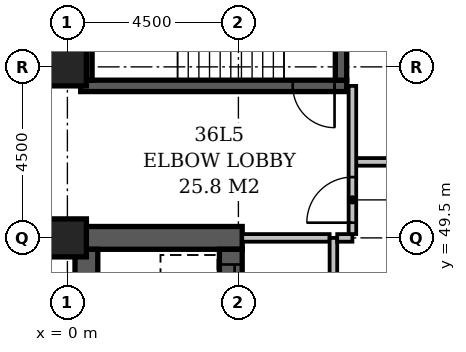
"""IFC4 building model, lengths in metres.
Left out: names, types, materials, properties, quantities, classifications, styles, units other than length and angle.
Written with IfcOpenShell. Run it as: python <this file> out.ifc"""

import sys

from ifc_helpers import new_model, si_unit, direction, frame, frame_2d, origin, origin_2d, place, context, subcontext, project, spatial, rectangle, extrude, element, fill, save


model = new_model("IFC4")
c1 = context("Model", 3, precision=1e-05, world=origin(), true_north=direction((0.0, 1.0)))
c2 = subcontext(c1, "Body", "Model", "MODEL_VIEW")
j1 = project(units=[si_unit("LENGTHUNIT", "METRE"), si_unit("PLANEANGLEUNIT", "RADIAN")], contexts=[c1])
p1 = place(None, origin())
s1 = spatial("IfcSite", under=j1, at=p1, CompositionType="ELEMENT")
p2 = place(p1, origin())
s2 = spatial("IfcBuilding", under=s1, at=p2, CompositionType="ELEMENT")
p3 = place(p2, frame((0.0, 0.0, 144.8)))
s3 = spatial("IfcBuildingStorey", under=s2, at=p3, CompositionType="ELEMENT", Elevation=144.8)
p4 = place(p3, frame((0.2, 49.5, -0.3), z_axis=(0.0, 0.0, 1.0), x_axis=(1.0, 0.0, 0.0)))
e1 = element("IfcWall", 1, at=p4, inside=s3, PredefinedType="SHEAR", context=c2, shape_type="SweptSolid", body=[
    extrude(rectangle(XDim=4.4, YDim=0.6, at=frame_2d((2.2, 0.0))), origin(), (0.0, 0.0, 1.0), 3.6),
])
p5 = place(p3, frame((0.35, 53.5, -0.3), z_axis=(0.0, 0.0, 1.0), x_axis=(1.0, 0.0, 0.0)))
e2 = element("IfcWall", 2, at=p5, inside=s3, PredefinedType="SHEAR", context=c2, shape_type="SweptSolid", body=[
    extrude(rectangle(XDim=7.0, YDim=0.3, at=frame_2d((3.5, 0.0))), origin(), (0.0, 0.0, 1.0), 3.6),
])
p6 = place(p5, frame((5.58, 0.0, 0.3)))
e3 = element("IfcOpeningElement", 3, at=p6, cuts=e2, PredefinedType="OPENING", context=c2, shape_type="SweptSolid", body=[
    extrude(rectangle(XDim=1.1, YDim=2.1, at=frame_2d((0.55, 1.05))), frame((0.0, 0.162, 0.0), z_axis=(0.0, -1.0, 0.0), x_axis=(1.0, 0.0, 0.0)), (0.0, 0.0, 1.0), 0.324),
])
p7 = place(p3, frame((0.5, 27.15, -0.3), z_axis=(0.0, 0.0, 1.0), x_axis=(0.0, 1.0, 0.0)))
e4 = element("IfcWall", 4, at=p7, inside=s3, PredefinedType="SHEAR", context=c2, shape_type="SweptSolid", body=[
    extrude(rectangle(XDim=22.05, YDim=0.6, at=frame_2d((11.025, 0.0))), origin(), (0.0, 0.0, 1.0), 3.6),
])
p8 = place(p3, frame((0.5, 53.65, -0.3), z_axis=(0.0, 0.0, 1.0), x_axis=(0.0, 1.0, 0.0)))
e5 = element("IfcWall", 5, at=p8, inside=s3, PredefinedType="SHEAR", context=c2, shape_type="SweptSolid", body=[
    extrude(rectangle(XDim=4.2, YDim=0.3, at=frame_2d((2.1, 0.0))), origin(), (0.0, 0.0, 1.0), 3.6),
])
p9 = place(p3, frame((4.3, 27.15, -0.3), z_axis=(0.0, 0.0, 1.0), x_axis=(0.0, 1.0, 0.0)))
e6 = element("IfcWall", 6, at=p9, inside=s3, PredefinedType="SHEAR", context=c2, shape_type="SweptSolid", body=[
    extrude(rectangle(XDim=22.05, YDim=0.6, at=frame_2d((11.025, 0.0))), origin(), (0.0, 0.0, 1.0), 3.6),
])
p10 = place(p9, frame((3.05, 0.0, 0.3)))
e7 = element("IfcOpeningElement", 7, at=p10, cuts=e6, PredefinedType="OPENING", context=c2, shape_type="SweptSolid", body=[
    extrude(rectangle(XDim=1.1, YDim=2.1, at=frame_2d((0.55, 1.05))), frame((0.0, 0.312, 0.0), z_axis=(0.0, -1.0, 0.0), x_axis=(1.0, 0.0, 0.0)), (0.0, 0.0, 1.0), 0.624),
])
p11 = place(p9, frame((0.55, 0.0, 0.3)))
e8 = element("IfcOpeningElement", 8, at=p11, cuts=e6, PredefinedType="OPENING", context=c2, shape_type="SweptSolid", body=[
    extrude(rectangle(XDim=1.1, YDim=2.1, at=frame_2d((0.55, 1.05))), frame((0.0, 0.312, 0.0), z_axis=(0.0, -1.0, 0.0), x_axis=(1.0, 0.0, 0.0)), (0.0, 0.0, 1.0), 0.624),
])
p12 = place(p9, frame((20.55, 0.0, 0.3)))
e9 = element("IfcOpeningElement", 9, at=p12, cuts=e6, PredefinedType="OPENING", context=c2, shape_type="SweptSolid", body=[
    extrude(rectangle(XDim=1.1, YDim=2.1, at=frame_2d((0.55, 1.05))), frame((0.0, 0.312, 0.0), z_axis=(0.0, -1.0, 0.0), x_axis=(1.0, 0.0, 0.0)), (0.0, 0.0, 1.0), 0.624),
])
p13 = place(p9, frame((18.05, 0.0, 0.3)))
e10 = element("IfcOpeningElement", 10, at=p13, cuts=e6, PredefinedType="OPENING", context=c2, shape_type="SweptSolid", body=[
    extrude(rectangle(XDim=1.1, YDim=2.1, at=frame_2d((0.55, 1.05))), frame((0.0, 0.312, 0.0), z_axis=(0.0, -1.0, 0.0), x_axis=(1.0, 0.0, 0.0)), (0.0, 0.0, 1.0), 0.624),
])
p14 = place(p9, frame((15.55, 0.0, 0.3)))
e11 = element("IfcOpeningElement", 11, at=p14, cuts=e6, PredefinedType="OPENING", context=c2, shape_type="SweptSolid", body=[
    extrude(rectangle(XDim=1.1, YDim=2.1, at=frame_2d((0.55, 1.05))), frame((0.0, 0.312, 0.0), z_axis=(0.0, -1.0, 0.0), x_axis=(1.0, 0.0, 0.0)), (0.0, 0.0, 1.0), 0.624),
])
p15 = place(p9, frame((13.05, 0.0, 0.3)))
e12 = element("IfcOpeningElement", 12, at=p15, cuts=e6, PredefinedType="OPENING", context=c2, shape_type="SweptSolid", body=[
    extrude(rectangle(XDim=1.1, YDim=2.1, at=frame_2d((0.55, 1.05))), frame((0.0, 0.312, 0.0), z_axis=(0.0, -1.0, 0.0), x_axis=(1.0, 0.0, 0.0)), (0.0, 0.0, 1.0), 0.624),
])
p16 = place(p9, frame((10.55, 0.0, 0.3)))
e13 = element("IfcOpeningElement", 13, at=p16, cuts=e6, PredefinedType="OPENING", context=c2, shape_type="SweptSolid", body=[
    extrude(rectangle(XDim=1.1, YDim=2.1, at=frame_2d((0.55, 1.05))), frame((0.0, 0.312, 0.0), z_axis=(0.0, -1.0, 0.0), x_axis=(1.0, 0.0, 0.0)), (0.0, 0.0, 1.0), 0.624),
])
p17 = place(p9, frame((8.05, 0.0, 0.3)))
e14 = element("IfcOpeningElement", 14, at=p17, cuts=e6, PredefinedType="OPENING", context=c2, shape_type="SweptSolid", body=[
    extrude(rectangle(XDim=1.1, YDim=2.1, at=frame_2d((0.55, 1.05))), frame((0.0, 0.312, 0.0), z_axis=(0.0, -1.0, 0.0), x_axis=(1.0, 0.0, 0.0)), (0.0, 0.0, 1.0), 0.624),
])
p18 = place(p9, frame((5.55, 0.0, 0.3)))
e15 = element("IfcOpeningElement", 15, at=p18, cuts=e6, PredefinedType="OPENING", context=c2, shape_type="SweptSolid", body=[
    extrude(rectangle(XDim=1.1, YDim=2.1, at=frame_2d((0.55, 1.05))), frame((0.0, 0.312, 0.0), z_axis=(0.0, -1.0, 0.0), x_axis=(1.0, 0.0, 0.0)), (0.0, 0.0, 1.0), 0.624),
])
p19 = place(p3, frame((7.2, 53.65, -0.3), z_axis=(0.0, 0.0, 1.0), x_axis=(0.0, 1.0, 0.0)))
e16 = element("IfcWall", 16, at=p19, inside=s3, PredefinedType="SHEAR", context=c2, shape_type="SweptSolid", body=[
    extrude(rectangle(XDim=4.2, YDim=0.3, at=frame_2d((2.1, 0.0))), origin(), (0.0, 0.0, 1.0), 3.6),
])
for number, where, z_axis, x_axis in (
    (17, (0.0, 49.5, -0.3), (0.0, 0.0, 1.0), (1.0, 0.0, 0.0)),
    (18, (0.0, 54.0, -0.3), (0.0, 0.0, 1.0), (1.0, 0.0, 0.0)),
):
    element("IfcColumn", number, at=place(p3, frame(where, z_axis=z_axis, x_axis=x_axis)), inside=s3, PredefinedType="COLUMN", context=c2, shape_type="SweptSolid", body=[
        extrude(rectangle(XDim=1.0, YDim=1.0, at=origin_2d()), origin(), (0.0, 0.0, 1.0), 3.6),
    ])
p20 = place(p3, frame((7.0, 34.6, 0.0), z_axis=(0.0, 0.0, 1.0), x_axis=(0.0, 1.0, 0.0)))
e19 = element("IfcWall", 19, at=p20, inside=s3, PredefinedType="PARTITIONING", context=c2, shape_type="SweptSolid", body=[
    extrude(rectangle(XDim=14.9, YDim=0.2, at=frame_2d((7.45, 0.0))), origin(), (0.0, 0.0, 1.0), 3.3),
])
p21 = place(p20, frame((2.8, 0.0, 0.0)))
e20 = element("IfcOpeningElement", 20, at=p21, cuts=e19, PredefinedType="OPENING", context=c2, shape_type="SweptSolid", body=[
    extrude(rectangle(XDim=1.2, YDim=2.1, at=frame_2d((0.6, 1.05))), frame((0.0, 0.112, 0.0), z_axis=(0.0, -1.0, 0.0), x_axis=(1.0, 0.0, 0.0)), (0.0, 0.0, 1.0), 0.224),
])
p22 = place(p20, frame((9.8, 0.0, 0.0)))
e21 = element("IfcOpeningElement", 21, at=p22, cuts=e19, PredefinedType="OPENING", context=c2, shape_type="SweptSolid", body=[
    extrude(rectangle(XDim=1.2, YDim=2.1, at=frame_2d((0.6, 1.05))), frame((0.0, 0.112, 0.0), z_axis=(0.0, -1.0, 0.0), x_axis=(1.0, 0.0, 0.0)), (0.0, 0.0, 1.0), 0.224),
])
p23 = place(p3, frame((4.6, 49.5, 0.0), z_axis=(0.0, 0.0, 1.0), x_axis=(1.0, 0.0, 0.0)))
e22 = element("IfcWall", 22, at=p23, inside=s3, PredefinedType="PARTITIONING", context=c2, shape_type="SweptSolid", body=[
    extrude(rectangle(XDim=2.3, YDim=0.2, at=frame_2d((1.15, 0.0))), origin(), (0.0, 0.0, 1.0), 3.3),
])
p24 = place(p3, frame((7.1, 49.5, 0.0), z_axis=(0.0, 0.0, 1.0), x_axis=(1.0, 0.0, 0.0)))
e23 = element("IfcWall", 23, at=p24, inside=s3, PredefinedType="PARTITIONING", context=c2, shape_type="SweptSolid", body=[
    extrude(rectangle(XDim=0.4, YDim=0.2, at=frame_2d((0.2, 0.0))), origin(), (0.0, 0.0, 1.0), 3.3),
])
p25 = place(p3, frame((7.5, 49.6, 0.0), z_axis=(0.0, 0.0, 1.0), x_axis=(0.0, 1.0, 0.0)))
e24 = element("IfcWall", 24, at=p25, inside=s3, PredefinedType="PARTITIONING", context=c2, shape_type="SweptSolid", body=[
    extrude(rectangle(XDim=3.9, YDim=0.2, at=frame_2d((1.95, 0.0))), origin(), (0.0, 0.0, 1.0), 3.3),
])
p26 = place(p25, frame((0.3, 0.0, 0.0)))
e25 = element("IfcOpeningElement", 25, at=p26, cuts=e24, PredefinedType="OPENING", context=c2, shape_type="SweptSolid", body=[
    extrude(rectangle(XDim=1.2, YDim=2.1, at=frame_2d((0.6, 1.05))), frame((0.0, 0.112, 0.0), z_axis=(0.0, -1.0, 0.0), x_axis=(1.0, 0.0, 0.0)), (0.0, 0.0, 1.0), 0.224),
])
p27 = place(p3, frame((7.6, 51.5, 0.0), z_axis=(0.0, 0.0, 1.0), x_axis=(1.0, 0.0, 0.0)))
e26 = element("IfcWall", 26, at=p27, inside=s3, PredefinedType="PARTITIONING", context=c2, shape_type="SweptSolid", body=[
    extrude(rectangle(XDim=15.3, YDim=0.2, at=frame_2d((7.65, 0.0))), origin(), (0.0, 0.0, 1.0), 3.3),
])
p28 = place(p27, frame((7.2, 0.0, 0.0)))
e27 = element("IfcOpeningElement", 27, at=p28, cuts=e26, PredefinedType="OPENING", context=c2, shape_type="SweptSolid", body=[
    extrude(rectangle(XDim=0.9, YDim=2.1, at=frame_2d((0.45, 1.05))), frame((0.0, 0.112, 0.0), z_axis=(0.0, -1.0, 0.0), x_axis=(1.0, 0.0, 0.0)), (0.0, 0.0, 1.0), 0.224),
])
p29 = place(p26, origin())
e28 = element("IfcDoor", 28, at=p29, inside=s3, OperationType="SINGLE_SWING_LEFT", PredefinedType="DOOR", context=c2, shape_type="SweptSolid", body=[
    extrude(rectangle(XDim=1.2, YDim=2.1, at=frame_2d((0.6, 1.05))), frame((0.0, 0.025, 0.0), z_axis=(0.0, -1.0, 0.0), x_axis=(1.0, 0.0, 0.0)), (0.0, 0.0, 1.0), 0.05),
])
fill(e25, e28)
p30 = place(p12, origin())
e29 = element("IfcDoor", 29, at=p30, inside=s3, OperationType="SLIDING_TO_LEFT", PredefinedType="DOOR", context=c2, shape_type="SweptSolid", body=[
    extrude(rectangle(XDim=1.1, YDim=2.1, at=frame_2d((0.55, 1.05))), frame((0.0, 0.025, 0.0), z_axis=(0.0, -1.0, 0.0), x_axis=(1.0, 0.0, 0.0)), (0.0, 0.0, 1.0), 0.05),
])
fill(e9, e29)
p31 = place(p6, origin())
e30 = element("IfcDoor", 30, at=p31, inside=s3, OperationType="SINGLE_SWING_RIGHT", PredefinedType="DOOR", context=c2, shape_type="SweptSolid", body=[
    extrude(rectangle(XDim=1.1, YDim=2.1, at=frame_2d((0.55, 1.05))), frame((0.0, 0.025, 0.0), z_axis=(0.0, -1.0, 0.0), x_axis=(1.0, 0.0, 0.0)), (0.0, 0.0, 1.0), 0.05),
])
fill(e3, e30)
save(model, sys.argv[1])
